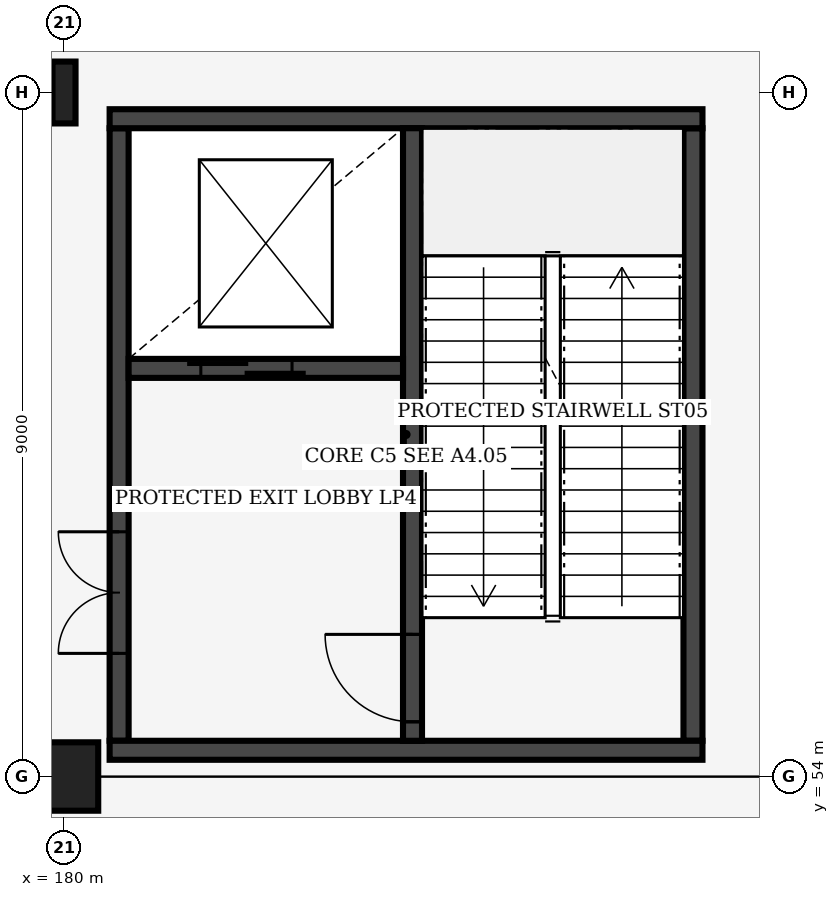
"""IFC4 building model, lengths in metres.
Left out: names, types, materials, properties, quantities, classifications, styles, units other than length and angle.
Written with IfcOpenShell. Run it as: python <this file> out.ifc"""

import sys

from ifc_helpers import new_model, si_unit, direction, frame, frame_2d, origin, origin_2d, place, context, subcontext, project, spatial, rectangle, i_section, extrude, element, fill, save


model = new_model("IFC4")
c1 = context("Model", 3, precision=1e-05, world=origin(), true_north=direction((0.0, 1.0)))
c2 = subcontext(c1, "Body", "Model", "MODEL_VIEW")
j1 = project(units=[si_unit("LENGTHUNIT", "METRE"), si_unit("PLANEANGLEUNIT", "RADIAN")], contexts=[c1])
p1 = place(None, origin())
s1 = spatial("IfcSite", under=j1, at=p1, CompositionType="ELEMENT")
p2 = place(p1, origin())
s2 = spatial("IfcBuilding", under=s1, at=p2, CompositionType="ELEMENT")
p3 = place(p2, origin())
s3 = spatial("IfcBuildingStorey", under=s2, at=p3, CompositionType="ELEMENT", Elevation=0.0)
p4 = place(p3, frame((180.0, 54.0, 0.0), z_axis=(0.0, 0.0, 1.0), x_axis=(1.0, 0.0, 0.0)))
e1 = element("IfcColumn", 1, at=p4, inside=s3, PredefinedType="COLUMN", context=c2, shape_type="SweptSolid", body=[
    extrude(rectangle(XDim=0.9, YDim=0.9, at=origin_2d()), origin(), (0.0, 0.0, 1.0), 6.0),
])
p5 = place(p3, frame((180.0, 63.0, 0.0), z_axis=(0.0, 0.0, 1.0), x_axis=(1.0, 0.0, 0.0)))
e2 = element("IfcColumn", 2, at=p5, inside=s3, PredefinedType="COLUMN", context=c2, shape_type="SweptSolid", body=[
    extrude(i_section(OverallWidth=0.303, OverallDepth=0.814, WebThickness=0.021, FlangeThickness=0.04, FilletRadius=0.03, at=origin_2d()), origin(), (0.0, 0.0, 1.0), 6.0),
])
p6 = place(p3, frame((180.725, 54.47, 0.0), z_axis=(0.0, 0.0, 1.0), x_axis=(0.0, 1.0, 0.0)))
e3 = element("IfcWall", 3, at=p6, inside=s3, PredefinedType="SHEAR", context=c2, shape_type="SweptSolid", body=[
    extrude(rectangle(XDim=8.06, YDim=0.25, at=frame_2d((4.03, 0.0))), origin(), (0.0, 0.0, 1.0), 5.64),
])
p7 = place(p6, frame((1.15, 0.0, 0.0)))
e4 = element("IfcOpeningElement", 4, at=p7, cuts=e3, PredefinedType="OPENING", context=c2, shape_type="SweptSolid", body=[
    extrude(rectangle(XDim=1.6, YDim=2.2, at=frame_2d((0.8, 1.1))), frame((0.0, 0.135, 0.0), z_axis=(0.0, -1.0, 0.0), x_axis=(1.0, 0.0, 0.0)), (0.0, 0.0, 1.0), 0.27),
])
p8 = place(p3, frame((188.275, 54.47, 0.0), z_axis=(0.0, 0.0, 1.0), x_axis=(0.0, 1.0, 0.0)))
e5 = element("IfcWall", 5, at=p8, inside=s3, PredefinedType="SHEAR", context=c2, shape_type="SweptSolid", body=[
    extrude(rectangle(XDim=8.06, YDim=0.25, at=frame_2d((4.03, 0.0))), origin(), (0.0, 0.0, 1.0), 5.64),
])
for number, where, z_axis, x_axis in (
    (6, (180.6, 54.345, 0.0), (0.0, 0.0, 1.0), (1.0, 0.0, 0.0)),
    (7, (180.6, 62.655, 0.0), (0.0, 0.0, 1.0), (1.0, 0.0, 0.0)),
):
    element("IfcWall", number, at=place(p3, frame(where, z_axis=z_axis, x_axis=x_axis)), inside=s3, PredefinedType="SHEAR", context=c2, shape_type="SweptSolid", body=[
        extrude(rectangle(XDim=7.8, YDim=0.25, at=frame_2d((3.9, 0.0))), origin(), (0.0, 0.0, 1.0), 5.64),
    ])
p9 = place(p3, frame((184.585, 54.47, 0.0), z_axis=(0.0, 0.0, 1.0), x_axis=(0.0, 1.0, 0.0)))
e8 = element("IfcWall", 8, at=p9, inside=s3, PredefinedType="SHEAR", context=c2, shape_type="SweptSolid", body=[
    extrude(rectangle(XDim=8.06, YDim=0.25, at=frame_2d((4.03, 0.0))), origin(), (0.0, 0.0, 1.0), 5.64),
])
p10 = place(p9, frame((0.25, 0.0, 0.0)))
e9 = element("IfcOpeningElement", 9, at=p10, cuts=e8, PredefinedType="OPENING", context=c2, shape_type="SweptSolid", body=[
    extrude(rectangle(XDim=1.15, YDim=2.15, at=frame_2d((0.575, 1.075))), frame((0.0, 0.135, 0.0), z_axis=(0.0, -1.0, 0.0), x_axis=(1.0, 0.0, 0.0)), (0.0, 0.0, 1.0), 0.27),
])
p11 = place(p3, frame((180.85, 59.37, 0.0), z_axis=(0.0, 0.0, 1.0), x_axis=(1.0, 0.0, 0.0)))
e10 = element("IfcWall", 10, at=p11, inside=s3, PredefinedType="SHEAR", context=c2, shape_type="SweptSolid", body=[
    extrude(rectangle(XDim=3.61, YDim=0.25, at=frame_2d((1.805, 0.0))), origin(), (0.0, 0.0, 1.0), 5.64),
])
p12 = place(p11, frame((0.95, 0.0, 0.0)))
e11 = element("IfcOpeningElement", 11, at=p12, cuts=e10, PredefinedType="OPENING", context=c2, shape_type="SweptSolid", body=[
    extrude(rectangle(XDim=1.2, YDim=2.2, at=frame_2d((0.6, 1.1))), frame((0.0, 0.135, 0.0), z_axis=(0.0, -1.0, 0.0), x_axis=(1.0, 0.0, 0.0)), (0.0, 0.0, 1.0), 0.27),
])
p13 = place(p10, origin())
e12 = element("IfcDoor", 12, at=p13, inside=s3, OperationType="SINGLE_SWING_RIGHT", PredefinedType="DOOR", context=c2, shape_type="SweptSolid", body=[
    extrude(rectangle(XDim=1.15, YDim=2.15, at=frame_2d((0.575, 1.075))), frame((0.0, 0.025, 0.0), z_axis=(0.0, -1.0, 0.0), x_axis=(1.0, 0.0, 0.0)), (0.0, 0.0, 1.0), 0.05),
])
fill(e9, e12)
p14 = place(p12, origin())
e13 = element("IfcDoor", 13, at=p14, inside=s3, OperationType="DOUBLE_DOOR_SLIDING", PredefinedType="DOOR", context=c2, shape_type="SweptSolid", body=[
    extrude(rectangle(XDim=1.2, YDim=2.2, at=frame_2d((0.6, 1.1))), frame((0.0, 0.025, 0.0), z_axis=(0.0, -1.0, 0.0), x_axis=(1.0, 0.0, 0.0)), (0.0, 0.0, 1.0), 0.05),
])
fill(e11, e13)
p15 = place(p7, origin())
e14 = element("IfcDoor", 14, at=p15, inside=s3, OperationType="DOUBLE_DOOR_SINGLE_SWING", PredefinedType="DOOR", context=c2, shape_type="SweptSolid", body=[
    extrude(rectangle(XDim=1.6, YDim=2.2, at=frame_2d((0.8, 1.1))), frame((0.0, 0.025, 0.0), z_axis=(0.0, -1.0, 0.0), x_axis=(1.0, 0.0, 0.0)), (0.0, 0.0, 1.0), 0.05),
])
fill(e4, e14)
save(model, sys.argv[1])
